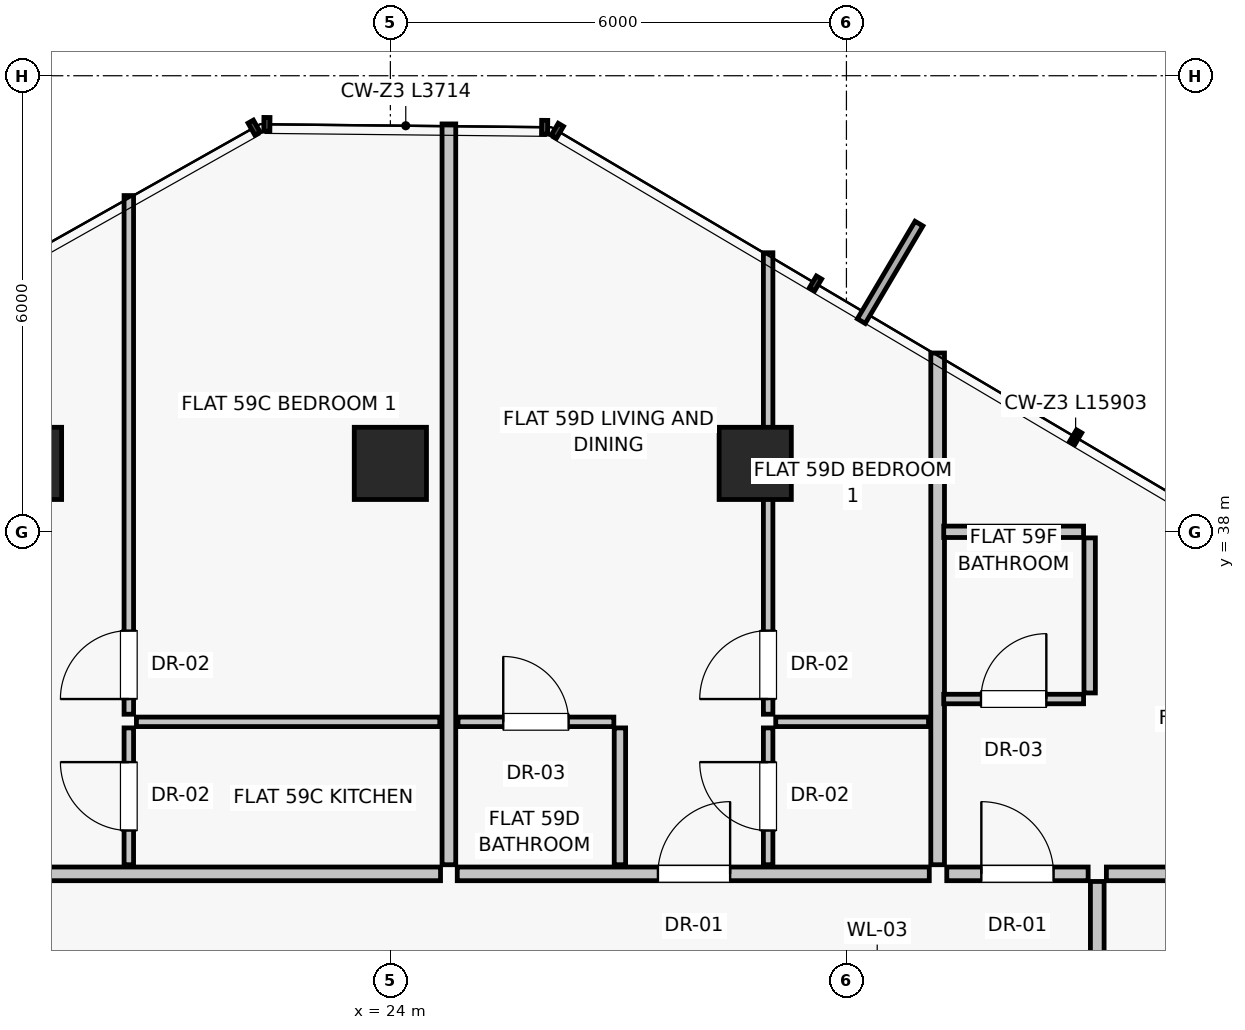
"""IFC4 building model, lengths in metres.
Left out: names, types, materials, properties, quantities, classifications, styles, units other than length and angle.
Written with IfcOpenShell. Run it as: python <this file> out.ifc"""

import sys

from ifc_helpers import new_model, si_unit, direction, frame, frame_2d, origin, origin_2d, place, context, subcontext, project, spatial, rectangle, extrude, source, transform, mapped, element, fill, save


model = new_model("IFC4")
c1 = context("Model", 3, precision=1e-05, world=origin(), true_north=direction((0.0, 1.0)))
c2 = subcontext(c1, "Body", "Model", "MODEL_VIEW")
j1 = project(units=[si_unit("LENGTHUNIT", "METRE"), si_unit("PLANEANGLEUNIT", "RADIAN")], contexts=[c1])
p1 = place(None, origin())
s1 = spatial("IfcSite", under=j1, at=p1, CompositionType="ELEMENT")
p2 = place(p1, origin())
s2 = spatial("IfcBuilding", under=s1, at=p2, CompositionType="ELEMENT")
p3 = place(p2, frame((0.0, 0.0, 208.1)))
s3 = spatial("IfcBuildingStorey", under=s2, at=p3, CompositionType="ELEMENT", Elevation=208.1)
for number, where, z_axis, x_axis in (
    (1, (28.8, 38.9, 0.0), (0.0, 0.0, 1.0), (1.0, 0.0, 0.0)),
    (2, (24.0, 38.9, 0.0), (0.0, 0.0, 1.0), (1.0, 0.0, 0.0)),
    (3, (19.2, 38.9, 0.0), (0.0, 0.0, 1.0), (1.0, 0.0, 0.0)),
):
    element("IfcColumn", number, at=place(p3, frame(where, z_axis=z_axis, x_axis=x_axis)), inside=s3, PredefinedType="COLUMN", context=c2, shape_type="SweptSolid", body=[
        extrude(rectangle(XDim=0.95, YDim=0.95, at=origin_2d()), origin(), (0.0, 0.0, 1.0), 3.25),
    ])
p4 = place(p3, frame((31.2, 33.62, 0.0), z_axis=(0.0, 0.0, 1.0), x_axis=(0.0, 1.0, 0.0)))
e4 = element("IfcWall", 4, at=p4, inside=s3, PredefinedType="PARTITIONING", context=c2, shape_type="SweptSolid", body=[
    extrude(rectangle(XDim=6.732, YDim=0.18, at=frame_2d((3.366, 0.0))), origin(), (0.0, 0.0, 1.0), 2.97),
])
p5 = place(p3, frame((15.31, 33.5, 0.0), z_axis=(0.0, 0.0, 1.0), x_axis=(1.0, 0.0, 0.0)))
e5 = element("IfcWall", 5, at=p5, inside=s3, PredefinedType="PARTITIONING", context=c2, shape_type="SweptSolid", body=[
    extrude(rectangle(XDim=9.35, YDim=0.18, at=frame_2d((4.675, 0.0))), origin(), (0.0, 0.0, 1.0), 2.97),
])
p6 = place(p5, frame((3.219, 0.0, 0.0)))
e6 = element("IfcOpeningElement", 6, at=p6, cuts=e5, PredefinedType="OPENING", context=c2, shape_type="SweptSolid", body=[
    extrude(rectangle(XDim=0.95, YDim=2.02, at=frame_2d((0.475, 1.01))), frame((0.0, 0.1, 0.0), z_axis=(0.0, -1.0, 0.0), x_axis=(1.0, 0.0, 0.0)), (0.0, 0.0, 1.0), 0.2),
])
p7 = place(p3, frame((20.559, 33.62, 0.0), z_axis=(0.0, 0.0, 1.0), x_axis=(0.0, 1.0, 0.0)))
e7 = element("IfcWall", 7, at=p7, inside=s3, PredefinedType="PARTITIONING", context=c2, shape_type="SweptSolid", body=[
    extrude(rectangle(XDim=1.8, YDim=0.125, at=frame_2d((0.9, 0.0))), origin(), (0.0, 0.0, 1.0), 2.424),
])
p8 = place(p7, frame((0.45, 0.0, 0.0)))
e8 = element("IfcOpeningElement", 8, at=p8, cuts=e7, PredefinedType="OPENING", context=c2, shape_type="SweptSolid", body=[
    extrude(rectangle(XDim=0.9, YDim=2.01, at=frame_2d((0.45, 1.005))), frame((0.0, 0.073, 0.0), z_axis=(0.0, -1.0, 0.0), x_axis=(1.0, 0.0, 0.0)), (0.0, 0.0, 1.0), 0.145),
])
p9 = place(p3, frame((20.659, 35.5, 0.0), z_axis=(0.0, 0.0, 1.0), x_axis=(1.0, 0.0, 0.0)))
e9 = element("IfcWall", 9, at=p9, inside=s3, PredefinedType="PARTITIONING", context=c2, shape_type="SweptSolid", body=[
    extrude(rectangle(XDim=3.991, YDim=0.125, at=frame_2d((1.996, 0.0))), origin(), (0.0, 0.0, 1.0), 2.617),
])
p10 = place(p3, frame((20.559, 35.6, 0.0), z_axis=(0.0, 0.0, 1.0), x_axis=(0.0, 1.0, 0.0)))
e10 = element("IfcWall", 10, at=p10, inside=s3, PredefinedType="PARTITIONING", context=c2, shape_type="SweptSolid", body=[
    extrude(rectangle(XDim=6.823, YDim=0.125, at=frame_2d((3.412, 0.0))), origin(), (0.0, 0.0, 1.0), 2.97),
])
p11 = place(p10, frame((0.2, 0.0, 0.0)))
e11 = element("IfcOpeningElement", 11, at=p11, cuts=e10, PredefinedType="OPENING", context=c2, shape_type="SweptSolid", body=[
    extrude(rectangle(XDim=0.9, YDim=2.01, at=frame_2d((0.45, 1.005))), frame((0.0, 0.073, 0.0), z_axis=(0.0, -1.0, 0.0), x_axis=(1.0, 0.0, 0.0)), (0.0, 0.0, 1.0), 0.145),
])
p12 = place(p3, frame((24.77, 33.62, 0.0), z_axis=(0.0, 0.0, 1.0), x_axis=(0.0, 1.0, 0.0)))
e12 = element("IfcWall", 12, at=p12, inside=s3, PredefinedType="PARTITIONING", context=c2, shape_type="SweptSolid", body=[
    extrude(rectangle(XDim=9.746, YDim=0.18, at=frame_2d((4.873, 0.0))), origin(), (0.0, 0.0, 1.0), 2.97),
])
p13 = place(p3, frame((24.88, 33.5, 0.0), z_axis=(0.0, 0.0, 1.0), x_axis=(1.0, 0.0, 0.0)))
e13 = element("IfcWall", 13, at=p13, inside=s3, PredefinedType="PARTITIONING", context=c2, shape_type="SweptSolid", body=[
    extrude(rectangle(XDim=6.21, YDim=0.18, at=frame_2d((3.105, 0.0))), origin(), (0.0, 0.0, 1.0), 2.97),
])
p14 = place(p13, frame((2.64, 0.0, 0.0)))
e14 = element("IfcOpeningElement", 14, at=p14, cuts=e13, PredefinedType="OPENING", context=c2, shape_type="SweptSolid", body=[
    extrude(rectangle(XDim=0.95, YDim=2.02, at=frame_2d((0.475, 1.01))), frame((0.0, 0.1, 0.0), z_axis=(0.0, -1.0, 0.0), x_axis=(1.0, 0.0, 0.0)), (0.0, 0.0, 1.0), 0.2),
])
p15 = place(p3, frame((27.02, 33.62, 0.0), z_axis=(0.0, 0.0, 1.0), x_axis=(0.0, 1.0, 0.0)))
e15 = element("IfcWall", 15, at=p15, inside=s3, PredefinedType="PARTITIONING", context=c2, shape_type="SweptSolid", body=[
    extrude(rectangle(XDim=1.8, YDim=0.15, at=frame_2d((0.9, 0.0))), origin(), (0.0, 0.0, 1.0), 2.97),
])
p16 = place(p3, frame((24.89, 35.5, 0.0), z_axis=(0.0, 0.0, 1.0), x_axis=(1.0, 0.0, 0.0)))
e16 = element("IfcWall", 16, at=p16, inside=s3, PredefinedType="PARTITIONING", context=c2, shape_type="SweptSolid", body=[
    extrude(rectangle(XDim=2.05, YDim=0.125, at=frame_2d((1.025, 0.0))), origin(), (0.0, 0.0, 1.0), 2.617),
])
p17 = place(p16, frame((0.595, 0.0, 0.0)))
e17 = element("IfcOpeningElement", 17, at=p17, cuts=e16, PredefinedType="OPENING", context=c2, shape_type="SweptSolid", body=[
    extrude(rectangle(XDim=0.86, YDim=2.01, at=frame_2d((0.43, 1.005))), frame((0.0, 0.073, 0.0), z_axis=(0.0, -1.0, 0.0), x_axis=(1.0, 0.0, 0.0)), (0.0, 0.0, 1.0), 0.145),
])
p18 = place(p3, frame((28.97, 33.62, 0.0), z_axis=(0.0, 0.0, 1.0), x_axis=(0.0, 1.0, 0.0)))
e18 = element("IfcWall", 18, at=p18, inside=s3, PredefinedType="PARTITIONING", context=c2, shape_type="SweptSolid", body=[
    extrude(rectangle(XDim=1.8, YDim=0.125, at=frame_2d((0.9, 0.0))), origin(), (0.0, 0.0, 1.0), 2.97),
])
p19 = place(p18, frame((0.45, 0.0, 0.0)))
e19 = element("IfcOpeningElement", 19, at=p19, cuts=e18, PredefinedType="OPENING", context=c2, shape_type="SweptSolid", body=[
    extrude(rectangle(XDim=0.9, YDim=2.01, at=frame_2d((0.45, 1.005))), frame((0.0, 0.073, 0.0), z_axis=(0.0, -1.0, 0.0), x_axis=(1.0, 0.0, 0.0)), (0.0, 0.0, 1.0), 0.145),
])
p20 = place(p3, frame((29.07, 35.5, 0.0), z_axis=(0.0, 0.0, 1.0), x_axis=(1.0, 0.0, 0.0)))
e20 = element("IfcWall", 20, at=p20, inside=s3, PredefinedType="PARTITIONING", context=c2, shape_type="SweptSolid", body=[
    extrude(rectangle(XDim=2.01, YDim=0.125, at=frame_2d((1.005, 0.0))), origin(), (0.0, 0.0, 1.0), 2.617),
])
p21 = place(p3, frame((28.97, 35.6, 0.0), z_axis=(0.0, 0.0, 1.0), x_axis=(0.0, 1.0, 0.0)))
e21 = element("IfcWall", 21, at=p21, inside=s3, PredefinedType="PARTITIONING", context=c2, shape_type="SweptSolid", body=[
    extrude(rectangle(XDim=6.071, YDim=0.125, at=frame_2d((3.036, 0.0))), origin(), (0.0, 0.0, 1.0), 2.424),
])
p22 = place(p21, frame((0.2, 0.0, 0.0)))
e22 = element("IfcOpeningElement", 22, at=p22, cuts=e21, PredefinedType="OPENING", context=c2, shape_type="SweptSolid", body=[
    extrude(rectangle(XDim=0.9, YDim=2.01, at=frame_2d((0.45, 1.005))), frame((0.0, 0.073, 0.0), z_axis=(0.0, -1.0, 0.0), x_axis=(1.0, 0.0, 0.0)), (0.0, 0.0, 1.0), 0.145),
])
p23 = place(p3, frame((33.3, 31.5, 0.0), z_axis=(0.0, 0.0, 1.0), x_axis=(0.0, 1.0, 0.0)))
e23 = element("IfcWall", 23, at=p23, inside=s3, PredefinedType="PARTITIONING", context=c2, shape_type="SweptSolid", body=[
    extrude(rectangle(XDim=1.9, YDim=0.18, at=frame_2d((0.95, 0.0))), origin(), (0.0, 0.0, 1.0), 2.97),
])
p24 = place(p3, frame((33.42, 33.5, 0.0), z_axis=(0.0, 0.0, 1.0), x_axis=(1.0, 0.0, 0.0)))
e24 = element("IfcWall", 24, at=p24, inside=s3, PredefinedType="PARTITIONING", context=c2, shape_type="SweptSolid", body=[
    extrude(rectangle(XDim=7.464, YDim=0.18, at=frame_2d((3.732, 0.0))), origin(), (0.0, 0.0, 1.0), 2.97),
])
p25 = place(p3, frame((31.32, 33.5, 0.0), z_axis=(0.0, 0.0, 1.0), x_axis=(1.0, 0.0, 0.0)))
e25 = element("IfcWall", 25, at=p25, inside=s3, PredefinedType="PARTITIONING", context=c2, shape_type="SweptSolid", body=[
    extrude(rectangle(XDim=1.86, YDim=0.18, at=frame_2d((0.93, 0.0))), origin(), (0.0, 0.0, 1.0), 2.97),
])
p26 = place(p25, frame((0.455, 0.0, 0.0)))
e26 = element("IfcOpeningElement", 26, at=p26, cuts=e25, PredefinedType="OPENING", context=c2, shape_type="SweptSolid", body=[
    extrude(rectangle(XDim=0.95, YDim=2.02, at=frame_2d((0.475, 1.01))), frame((0.0, 0.1, 0.0), z_axis=(0.0, -1.0, 0.0), x_axis=(1.0, 0.0, 0.0)), (0.0, 0.0, 1.0), 0.2),
])
p27 = place(p3, frame((31.28, 35.8, 0.0), z_axis=(0.0, 0.0, 1.0), x_axis=(1.0, 0.0, 0.0)))
e27 = element("IfcWall", 27, at=p27, inside=s3, PredefinedType="PARTITIONING", context=c2, shape_type="SweptSolid", body=[
    extrude(rectangle(XDim=1.84, YDim=0.125, at=frame_2d((0.92, 0.0))), origin(), (0.0, 0.0, 1.0), 2.97),
])
p28 = place(p27, frame((0.49, 0.0, 0.0)))
e28 = element("IfcOpeningElement", 28, at=p28, cuts=e27, PredefinedType="OPENING", context=c2, shape_type="SweptSolid", body=[
    extrude(rectangle(XDim=0.86, YDim=2.01, at=frame_2d((0.43, 1.005))), frame((0.0, 0.073, 0.0), z_axis=(0.0, -1.0, 0.0), x_axis=(1.0, 0.0, 0.0)), (0.0, 0.0, 1.0), 0.145),
])
p29 = place(p3, frame((31.28, 38.0, 0.0), z_axis=(0.0, 0.0, 1.0), x_axis=(1.0, 0.0, 0.0)))
e29 = element("IfcWall", 29, at=p29, inside=s3, PredefinedType="PARTITIONING", context=c2, shape_type="SweptSolid", body=[
    extrude(rectangle(XDim=1.84, YDim=0.15, at=frame_2d((0.92, 0.0))), origin(), (0.0, 0.0, 1.0), 2.97),
])
p30 = place(p3, frame((33.2, 35.88, 0.0), z_axis=(0.0, 0.0, 1.0), x_axis=(0.0, 1.0, 0.0)))
e30 = element("IfcWall", 30, at=p30, inside=s3, PredefinedType="PARTITIONING", context=c2, shape_type="SweptSolid", body=[
    extrude(rectangle(XDim=2.04, YDim=0.15, at=frame_2d((1.02, 0.0))), origin(), (0.0, 0.0, 1.0), 2.97),
])
m1 = source(origin(), c2, "Body", "SweptSolid", [
    extrude(rectangle(XDim=0.9, YDim=2.01, at=frame_2d((0.45, 1.005))), frame((0.0, 0.025, 0.0), z_axis=(0.0, -1.0, 0.0), x_axis=(1.0, 0.0, 0.0)), (0.0, 0.0, 1.0), 0.05),
])
p31 = place(p8, origin())
e31 = element("IfcDoor", 31, at=p31, inside=s3, OperationType="SINGLE_SWING_RIGHT", PredefinedType="DOOR", context=c2, shape_type="MappedRepresentation", body=[
    mapped(m1, transform((0.0, 0.0, 0.0), scale=1.0)),
])
fill(e8, e31)
p32 = place(p11, origin())
e32 = element("IfcDoor", 32, at=p32, inside=s3, OperationType="SINGLE_SWING_LEFT", PredefinedType="DOOR", context=c2, shape_type="MappedRepresentation", body=[
    mapped(m1, transform((0.0, 0.0, 0.0), scale=1.0)),
])
fill(e11, e32)
m2 = source(origin(), c2, "Body", "SweptSolid", [
    extrude(rectangle(XDim=0.95, YDim=2.02, at=frame_2d((0.475, 1.01))), frame((0.0, 0.025, 0.0), z_axis=(0.0, -1.0, 0.0), x_axis=(1.0, 0.0, 0.0)), (0.0, 0.0, 1.0), 0.05),
])
p33 = place(p14, origin())
e33 = element("IfcDoor", 33, at=p33, inside=s3, OperationType="SINGLE_SWING_RIGHT", PredefinedType="DOOR", context=c2, shape_type="MappedRepresentation", body=[
    mapped(m2, transform((0.0, 0.0, 0.0), scale=1.0)),
])
fill(e14, e33)
m3 = source(origin(), c2, "Body", "SweptSolid", [
    extrude(rectangle(XDim=0.86, YDim=2.01, at=frame_2d((0.43, 1.005))), frame((0.0, 0.025, 0.0), z_axis=(0.0, -1.0, 0.0), x_axis=(1.0, 0.0, 0.0)), (0.0, 0.0, 1.0), 0.05),
])
p34 = place(p17, origin())
e34 = element("IfcDoor", 34, at=p34, inside=s3, OperationType="SINGLE_SWING_LEFT", PredefinedType="DOOR", context=c2, shape_type="MappedRepresentation", body=[
    mapped(m3, transform((0.0, 0.0, 0.0), scale=1.0)),
])
fill(e17, e34)
p35 = place(p19, origin())
e35 = element("IfcDoor", 35, at=p35, inside=s3, OperationType="SINGLE_SWING_RIGHT", PredefinedType="DOOR", context=c2, shape_type="MappedRepresentation", body=[
    mapped(m1, transform((0.0, 0.0, 0.0), scale=1.0)),
])
fill(e19, e35)
p36 = place(p22, origin())
e36 = element("IfcDoor", 36, at=p36, inside=s3, OperationType="SINGLE_SWING_LEFT", PredefinedType="DOOR", context=c2, shape_type="MappedRepresentation", body=[
    mapped(m1, transform((0.0, 0.0, 0.0), scale=1.0)),
])
fill(e22, e36)
p37 = place(p26, origin())
e37 = element("IfcDoor", 37, at=p37, inside=s3, OperationType="SINGLE_SWING_LEFT", PredefinedType="DOOR", context=c2, shape_type="MappedRepresentation", body=[
    mapped(m2, transform((0.0, 0.0, 0.0), scale=1.0)),
])
fill(e26, e37)
p38 = place(p28, origin())
e38 = element("IfcDoor", 38, at=p38, inside=s3, OperationType="SINGLE_SWING_RIGHT", PredefinedType="DOOR", context=c2, shape_type="MappedRepresentation", body=[
    mapped(m3, transform((0.0, 0.0, 0.0), scale=1.0)),
])
fill(e28, e38)
save(model, sys.argv[1])
